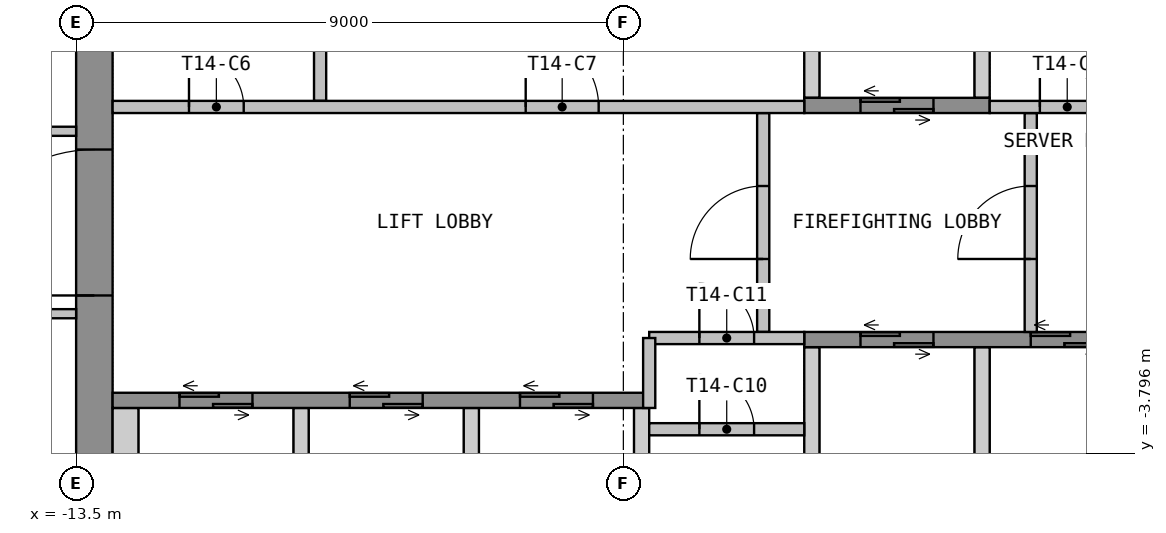
"""IFC4 building model, lengths in metres.
Left out: names, types, materials, properties, quantities, classifications, styles, units other than length and angle.
Written with IfcOpenShell. Run it as: python <this file> out.ifc"""

import sys

from ifc_helpers import new_model, si_unit, direction, frame, frame_2d, origin, place, context, subcontext, project, spatial, polyline, rectangle, outline, extrude, element, fill, save


model = new_model("IFC4")
c1 = context("Model", 3, precision=1e-05, world=origin(), true_north=direction((0.0, 1.0)))
c2 = subcontext(c1, "Body", "Model", "MODEL_VIEW")
j1 = project(units=[si_unit("LENGTHUNIT", "METRE"), si_unit("PLANEANGLEUNIT", "RADIAN")], contexts=[c1])
p1 = place(None, origin())
s1 = spatial("IfcSite", under=j1, at=p1, CompositionType="ELEMENT")
p2 = place(p1, origin())
s2 = spatial("IfcBuilding", under=s1, at=p2, CompositionType="ELEMENT")
p3 = place(p2, frame((0.0, 0.0, 195.6)))
s3 = spatial("IfcBuildingStorey", under=s2, at=p3, CompositionType="ELEMENT", Elevation=195.6)
p4 = place(p3, frame((-13.2, -10.65, 0.0), z_axis=(0.0, 0.0, 1.0), x_axis=(0.0, 1.0, 0.0)))
e1 = element("IfcWall", 1, at=p4, inside=s3, PredefinedType="SHEAR", context=c2, shape_type="SweptSolid", body=[
    extrude(rectangle(XDim=21.3, YDim=0.6, at=frame_2d((10.65, 0.0))), origin(), (0.0, 0.0, 1.0), 3.55),
])
p5 = place(p4, frame((9.45, 0.0, 0.0)))
e2 = element("IfcOpeningElement", 2, at=p5, cuts=e1, PredefinedType="OPENING", context=c2, shape_type="SweptSolid", body=[
    extrude(rectangle(XDim=2.4, YDim=2.1, at=frame_2d((1.2, 1.05))), frame((0.0, 0.31, 0.0), z_axis=(0.0, -1.0, 0.0), x_axis=(1.0, 0.0, 0.0)), (0.0, 0.0, 1.0), 0.62),
])
p6 = place(p3, origin())
e3 = element("IfcWall", 3, at=p6, inside=s3, PredefinedType="SHEAR", context=c2, shape_type="SweptSolid", body=[
    extrude(outline(polyline([(-1.525, 2.05), (-1.275, 2.05), (-1.275, 4.75), (-1.525, 4.75), (-1.525, 2.05)])), origin(), (0.0, 0.0, 1.0), 3.55),
])
p7 = place(p3, origin())
e4 = element("IfcWall", 4, at=p7, inside=s3, PredefinedType="SHEAR", context=c2, shape_type="SweptSolid", body=[
    extrude(outline(polyline([(1.275, 2.05), (1.525, 2.05), (1.525, 4.75), (1.275, 4.75), (1.275, 2.05)])), origin(), (0.0, 0.0, 1.0), 3.55),
])
p8 = place(p3, frame((-1.525, 1.925, 0.0), z_axis=(0.0, 0.0, 1.0), x_axis=(1.0, 0.0, 0.0)))
e5 = element("IfcWall", 5, at=p8, inside=s3, PredefinedType="SHEAR", context=c2, shape_type="SweptSolid", body=[
    extrude(rectangle(XDim=3.05, YDim=0.25, at=frame_2d((1.525, 0.0))), origin(), (0.0, 0.0, 1.0), 3.55),
])
p9 = place(p8, frame((0.925, 0.0, 0.0)))
e6 = element("IfcOpeningElement", 6, at=p9, cuts=e5, PredefinedType="OPENING", context=c2, shape_type="SweptSolid", body=[
    extrude(rectangle(XDim=1.2, YDim=2.1, at=frame_2d((0.6, 1.05))), frame((0.0, 0.135, 0.0), z_axis=(0.0, -1.0, 0.0), x_axis=(1.0, 0.0, 0.0)), (0.0, 0.0, 1.0), 0.27),
])
p10 = place(p3, origin())
e7 = element("IfcWall", 7, at=p10, inside=s3, PredefinedType="SHEAR", context=c2, shape_type="SweptSolid", body=[
    extrude(outline(polyline([(-12.9, -4.75), (-12.475, -4.75), (-12.475, -3.05), (-12.9, -3.05), (-12.9, -4.75)])), origin(), (0.0, 0.0, 1.0), 3.55),
])
p11 = place(p3, origin())
e8 = element("IfcWall", 8, at=p11, inside=s3, PredefinedType="SHEAR", context=c2, shape_type="SweptSolid", body=[
    extrude(outline(polyline([(-9.925, -4.75), (-9.675, -4.75), (-9.675, -3.05), (-9.925, -3.05), (-9.925, -4.75)])), origin(), (0.0, 0.0, 1.0), 3.55),
])
p12 = place(p3, origin())
e9 = element("IfcWall", 9, at=p12, inside=s3, PredefinedType="SHEAR", context=c2, shape_type="SweptSolid", body=[
    extrude(outline(polyline([(-7.125, -4.75), (-6.875, -4.75), (-6.875, -3.05), (-7.125, -3.05), (-7.125, -4.75)])), origin(), (0.0, 0.0, 1.0), 3.55),
])
p13 = place(p3, origin())
e10 = element("IfcWall", 10, at=p13, inside=s3, PredefinedType="SHEAR", context=c2, shape_type="SweptSolid", body=[
    extrude(outline(polyline([(-4.325, -4.75), (-4.075, -4.75), (-4.075, -3.05), (-4.325, -3.05), (-4.325, -4.75)])), origin(), (0.0, 0.0, 1.0), 3.55),
])
p14 = place(p3, origin())
e11 = element("IfcWall", 11, at=p14, inside=s3, PredefinedType="SHEAR", context=c2, shape_type="SweptSolid", body=[
    extrude(outline(polyline([(-1.525, -4.75), (-1.275, -4.75), (-1.275, -2.05), (-1.525, -2.05), (-1.525, -4.75)])), origin(), (0.0, 0.0, 1.0), 3.55),
])
p15 = place(p3, origin())
e12 = element("IfcWall", 12, at=p15, inside=s3, PredefinedType="SHEAR", context=c2, shape_type="SweptSolid", body=[
    extrude(outline(polyline([(1.275, -4.75), (1.525, -4.75), (1.525, -2.05), (1.275, -2.05), (1.275, -4.75)])), origin(), (0.0, 0.0, 1.0), 3.55),
])
p16 = place(p3, frame((-12.9, -2.925, 0.0), z_axis=(0.0, 0.0, 1.0), x_axis=(1.0, 0.0, 0.0)))
e13 = element("IfcWall", 13, at=p16, inside=s3, PredefinedType="SHEAR", context=c2, shape_type="SweptSolid", body=[
    extrude(rectangle(XDim=8.825, YDim=0.25, at=frame_2d((4.413, 0.0))), origin(), (0.0, 0.0, 1.0), 3.55),
])
p17 = place(p16, frame((1.1, 0.0, 0.0)))
e14 = element("IfcOpeningElement", 14, at=p17, cuts=e13, PredefinedType="OPENING", context=c2, shape_type="SweptSolid", body=[
    extrude(rectangle(XDim=1.2, YDim=2.1, at=frame_2d((0.6, 1.05))), frame((0.0, 0.135, 0.0), z_axis=(0.0, -1.0, 0.0), x_axis=(1.0, 0.0, 0.0)), (0.0, 0.0, 1.0), 0.27),
])
p18 = place(p16, frame((3.9, 0.0, 0.0)))
e15 = element("IfcOpeningElement", 15, at=p18, cuts=e13, PredefinedType="OPENING", context=c2, shape_type="SweptSolid", body=[
    extrude(rectangle(XDim=1.2, YDim=2.1, at=frame_2d((0.6, 1.05))), frame((0.0, 0.135, 0.0), z_axis=(0.0, -1.0, 0.0), x_axis=(1.0, 0.0, 0.0)), (0.0, 0.0, 1.0), 0.27),
])
p19 = place(p16, frame((6.7, 0.0, 0.0)))
e16 = element("IfcOpeningElement", 16, at=p19, cuts=e13, PredefinedType="OPENING", context=c2, shape_type="SweptSolid", body=[
    extrude(rectangle(XDim=1.2, YDim=2.1, at=frame_2d((0.6, 1.05))), frame((0.0, 0.135, 0.0), z_axis=(0.0, -1.0, 0.0), x_axis=(1.0, 0.0, 0.0)), (0.0, 0.0, 1.0), 0.27),
])
p20 = place(p3, frame((-1.525, -1.925, 0.0), z_axis=(0.0, 0.0, 1.0), x_axis=(1.0, 0.0, 0.0)))
e17 = element("IfcWall", 17, at=p20, inside=s3, PredefinedType="SHEAR", context=c2, shape_type="SweptSolid", body=[
    extrude(rectangle(XDim=14.425, YDim=0.25, at=frame_2d((7.212, 0.0))), origin(), (0.0, 0.0, 1.0), 3.55),
])
p21 = place(p20, frame((0.925, 0.0, 0.0)))
e18 = element("IfcOpeningElement", 18, at=p21, cuts=e17, PredefinedType="OPENING", context=c2, shape_type="SweptSolid", body=[
    extrude(rectangle(XDim=1.2, YDim=2.1, at=frame_2d((0.6, 1.05))), frame((0.0, 0.135, 0.0), z_axis=(0.0, -1.0, 0.0), x_axis=(1.0, 0.0, 0.0)), (0.0, 0.0, 1.0), 0.27),
])
p22 = place(p20, frame((3.725, 0.0, 0.0)))
e19 = element("IfcOpeningElement", 19, at=p22, cuts=e17, PredefinedType="OPENING", context=c2, shape_type="SweptSolid", body=[
    extrude(rectangle(XDim=1.2, YDim=2.1, at=frame_2d((0.6, 1.05))), frame((0.0, 0.135, 0.0), z_axis=(0.0, -1.0, 0.0), x_axis=(1.0, 0.0, 0.0)), (0.0, 0.0, 1.0), 0.27),
])
p23 = place(p3, frame((-2.2, -1.8, 0.0), z_axis=(0.0, 0.0, 1.0), x_axis=(0.0, 1.0, 0.0)))
e20 = element("IfcWall", 20, at=p23, inside=s3, PredefinedType="PARTITIONING", context=c2, shape_type="SweptSolid", body=[
    extrude(rectangle(XDim=3.6, YDim=0.2, at=frame_2d((1.8, 0.0))), origin(), (0.0, 0.0, 1.0), 3.55),
])
p24 = place(p23, frame((1.2, 0.0, 0.0)))
e21 = element("IfcOpeningElement", 21, at=p24, cuts=e20, PredefinedType="OPENING", context=c2, shape_type="SweptSolid", body=[
    extrude(rectangle(XDim=1.2, YDim=2.1, at=frame_2d((0.6, 1.05))), frame((0.0, 0.11, 0.0), z_axis=(0.0, -1.0, 0.0), x_axis=(1.0, 0.0, 0.0)), (0.0, 0.0, 1.0), 0.22),
])
p25 = place(p3, frame((2.2, -1.8, 0.0), z_axis=(0.0, 0.0, 1.0), x_axis=(0.0, 1.0, 0.0)))
e22 = element("IfcWall", 22, at=p25, inside=s3, PredefinedType="PARTITIONING", context=c2, shape_type="SweptSolid", body=[
    extrude(rectangle(XDim=3.6, YDim=0.2, at=frame_2d((1.8, 0.0))), origin(), (0.0, 0.0, 1.0), 3.55),
])
p26 = place(p25, frame((1.2, 0.0, 0.0)))
e23 = element("IfcOpeningElement", 23, at=p26, cuts=e22, PredefinedType="OPENING", context=c2, shape_type="SweptSolid", body=[
    extrude(rectangle(XDim=1.2, YDim=2.1, at=frame_2d((0.6, 1.05))), frame((0.0, 0.11, 0.0), z_axis=(0.0, -1.0, 0.0), x_axis=(1.0, 0.0, 0.0)), (0.0, 0.0, 1.0), 0.22),
])
p27 = place(p3, frame((-9.488, 2.0, 0.0), z_axis=(0.0, 0.0, 1.0), x_axis=(0.0, 1.0, 0.0)))
e24 = element("IfcWall", 24, at=p27, inside=s3, PredefinedType="PARTITIONING", context=c2, shape_type="SweptSolid", body=[
    extrude(rectangle(XDim=2.8, YDim=0.2, at=frame_2d((1.4, 0.0))), origin(), (0.0, 0.0, 1.0), 3.55),
])
p28 = place(p3, frame((-12.9, 1.9, 0.0), z_axis=(0.0, 0.0, 1.0), x_axis=(1.0, 0.0, 0.0)))
e25 = element("IfcWall", 25, at=p28, inside=s3, PredefinedType="PARTITIONING", context=c2, shape_type="SweptSolid", body=[
    extrude(rectangle(XDim=11.375, YDim=0.2, at=frame_2d((5.688, 0.0))), origin(), (0.0, 0.0, 1.0), 3.55),
])
p29 = place(p28, frame((1.256, 0.0, 0.0)))
e26 = element("IfcOpeningElement", 26, at=p29, cuts=e25, PredefinedType="OPENING", context=c2, shape_type="SweptSolid", body=[
    extrude(rectangle(XDim=0.9, YDim=2.1, at=frame_2d((0.45, 1.05))), frame((0.0, 0.11, 0.0), z_axis=(0.0, -1.0, 0.0), x_axis=(1.0, 0.0, 0.0)), (0.0, 0.0, 1.0), 0.22),
])
p30 = place(p28, frame((6.794, 0.0, 0.0)))
e27 = element("IfcOpeningElement", 27, at=p30, cuts=e25, PredefinedType="OPENING", context=c2, shape_type="SweptSolid", body=[
    extrude(rectangle(XDim=1.2, YDim=2.1, at=frame_2d((0.6, 1.05))), frame((0.0, 0.11, 0.0), z_axis=(0.0, -1.0, 0.0), x_axis=(1.0, 0.0, 0.0)), (0.0, 0.0, 1.0), 0.22),
])
p31 = place(p3, frame((1.525, 1.9, 0.0), z_axis=(0.0, 0.0, 1.0), x_axis=(1.0, 0.0, 0.0)))
e28 = element("IfcWall", 28, at=p31, inside=s3, PredefinedType="PARTITIONING", context=c2, shape_type="SweptSolid", body=[
    extrude(rectangle(XDim=2.55, YDim=0.2, at=frame_2d((1.275, 0.0))), origin(), (0.0, 0.0, 1.0), 3.55),
])
p32 = place(p31, frame((0.825, 0.0, 0.0)))
e29 = element("IfcOpeningElement", 29, at=p32, cuts=e28, PredefinedType="OPENING", context=c2, shape_type="SweptSolid", body=[
    extrude(rectangle(XDim=0.9, YDim=2.1, at=frame_2d((0.45, 1.05))), frame((0.0, 0.11, 0.0), z_axis=(0.0, -1.0, 0.0), x_axis=(1.0, 0.0, 0.0)), (0.0, 0.0, 1.0), 0.22),
])
p33 = place(p3, frame((-4.075, -3.4, 0.0), z_axis=(0.0, 0.0, 1.0), x_axis=(1.0, 0.0, 0.0)))
e30 = element("IfcWall", 30, at=p33, inside=s3, PredefinedType="PARTITIONING", context=c2, shape_type="SweptSolid", body=[
    extrude(rectangle(XDim=2.55, YDim=0.2, at=frame_2d((1.275, 0.0))), origin(), (0.0, 0.0, 1.0), 3.55),
])
p34 = place(p33, frame((0.825, 0.0, 0.0)))
e31 = element("IfcOpeningElement", 31, at=p34, cuts=e30, PredefinedType="OPENING", context=c2, shape_type="SweptSolid", body=[
    extrude(rectangle(XDim=0.9, YDim=2.1, at=frame_2d((0.45, 1.05))), frame((0.0, 0.11, 0.0), z_axis=(0.0, -1.0, 0.0), x_axis=(1.0, 0.0, 0.0)), (0.0, 0.0, 1.0), 0.22),
])
p35 = place(p3, frame((-4.075, -1.9, 0.0), z_axis=(0.0, 0.0, 1.0), x_axis=(1.0, 0.0, 0.0)))
e32 = element("IfcWall", 32, at=p35, inside=s3, PredefinedType="PARTITIONING", context=c2, shape_type="SweptSolid", body=[
    extrude(rectangle(XDim=2.55, YDim=0.2, at=frame_2d((1.275, 0.0))), origin(), (0.0, 0.0, 1.0), 3.55),
])
p36 = place(p35, frame((0.825, 0.0, 0.0)))
e33 = element("IfcOpeningElement", 33, at=p36, cuts=e32, PredefinedType="OPENING", context=c2, shape_type="SweptSolid", body=[
    extrude(rectangle(XDim=0.9, YDim=2.1, at=frame_2d((0.45, 1.05))), frame((0.0, 0.11, 0.0), z_axis=(0.0, -1.0, 0.0), x_axis=(1.0, 0.0, 0.0)), (0.0, 0.0, 1.0), 0.22),
])
p37 = place(p3, frame((-4.075, -1.9, 0.0), z_axis=(0.0, 0.0, 1.0), x_axis=(0.0, -1.0, 0.0)))
e34 = element("IfcWall", 34, at=p37, inside=s3, PredefinedType="PARTITIONING", context=c2, shape_type="SweptSolid", body=[
    extrude(rectangle(XDim=1.15, YDim=0.2, at=frame_2d((0.575, 0.0))), origin(), (0.0, 0.0, 1.0), 3.55),
])
for number, where, z_axis, x_axis in (
    (35, (-17.925, -1.5, 0.0), (0.0, 0.0, 1.0), (1.0, 0.0, 0.0)),
    (36, (-13.5, 1.5, 0.0), (0.0, 0.0, 1.0), (-1.0, 0.0, 0.0)),
):
    element("IfcWall", number, at=place(p3, frame(where, z_axis=z_axis, x_axis=x_axis)), inside=s3, PredefinedType="PARTITIONING", context=c2, shape_type="SweptSolid", body=[
        extrude(rectangle(XDim=4.425, YDim=0.15, at=frame_2d((2.212, 0.0))), origin(), (0.0, 0.0, 1.0), 3.55),
    ])
p38 = place(p5, origin())
e37 = element("IfcDoor", 37, at=p38, inside=s3, OperationType="DOUBLE_DOOR_DOUBLE_SWING", PredefinedType="DOOR", context=c2, shape_type="SweptSolid", body=[
    extrude(rectangle(XDim=2.4, YDim=2.1, at=frame_2d((1.2, 1.05))), frame((0.0, 0.025, 0.0), z_axis=(0.0, -1.0, 0.0), x_axis=(1.0, 0.0, 0.0)), (0.0, 0.0, 1.0), 0.05),
])
fill(e2, e37)
p39 = place(p9, origin())
e38 = element("IfcDoor", 38, at=p39, inside=s3, OperationType="DOUBLE_DOOR_SLIDING", PredefinedType="DOOR", context=c2, shape_type="SweptSolid", body=[
    extrude(rectangle(XDim=1.2, YDim=2.1, at=frame_2d((0.6, 1.05))), frame((0.0, 0.025, 0.0), z_axis=(0.0, -1.0, 0.0), x_axis=(1.0, 0.0, 0.0)), (0.0, 0.0, 1.0), 0.05),
])
fill(e6, e38)
p40 = place(p17, origin())
e39 = element("IfcDoor", 39, at=p40, inside=s3, OperationType="DOUBLE_DOOR_SLIDING", PredefinedType="DOOR", context=c2, shape_type="SweptSolid", body=[
    extrude(rectangle(XDim=1.2, YDim=2.1, at=frame_2d((0.6, 1.05))), frame((0.0, 0.025, 0.0), z_axis=(0.0, -1.0, 0.0), x_axis=(1.0, 0.0, 0.0)), (0.0, 0.0, 1.0), 0.05),
])
fill(e14, e39)
p41 = place(p18, origin())
e40 = element("IfcDoor", 40, at=p41, inside=s3, OperationType="DOUBLE_DOOR_SLIDING", PredefinedType="DOOR", context=c2, shape_type="SweptSolid", body=[
    extrude(rectangle(XDim=1.2, YDim=2.1, at=frame_2d((0.6, 1.05))), frame((0.0, 0.025, 0.0), z_axis=(0.0, -1.0, 0.0), x_axis=(1.0, 0.0, 0.0)), (0.0, 0.0, 1.0), 0.05),
])
fill(e15, e40)
p42 = place(p19, origin())
e41 = element("IfcDoor", 41, at=p42, inside=s3, OperationType="DOUBLE_DOOR_SLIDING", PredefinedType="DOOR", context=c2, shape_type="SweptSolid", body=[
    extrude(rectangle(XDim=1.2, YDim=2.1, at=frame_2d((0.6, 1.05))), frame((0.0, 0.025, 0.0), z_axis=(0.0, -1.0, 0.0), x_axis=(1.0, 0.0, 0.0)), (0.0, 0.0, 1.0), 0.05),
])
fill(e16, e41)
p43 = place(p21, origin())
e42 = element("IfcDoor", 42, at=p43, inside=s3, OperationType="DOUBLE_DOOR_SLIDING", PredefinedType="DOOR", context=c2, shape_type="SweptSolid", body=[
    extrude(rectangle(XDim=1.2, YDim=2.1, at=frame_2d((0.6, 1.05))), frame((0.0, 0.025, 0.0), z_axis=(0.0, -1.0, 0.0), x_axis=(1.0, 0.0, 0.0)), (0.0, 0.0, 1.0), 0.05),
])
fill(e18, e42)
p44 = place(p22, origin())
e43 = element("IfcDoor", 43, at=p44, inside=s3, OperationType="DOUBLE_DOOR_SLIDING", PredefinedType="DOOR", context=c2, shape_type="SweptSolid", body=[
    extrude(rectangle(XDim=1.2, YDim=2.1, at=frame_2d((0.6, 1.05))), frame((0.0, 0.025, 0.0), z_axis=(0.0, -1.0, 0.0), x_axis=(1.0, 0.0, 0.0)), (0.0, 0.0, 1.0), 0.05),
])
fill(e19, e43)
p45 = place(p24, origin())
e44 = element("IfcDoor", 44, at=p45, inside=s3, OperationType="SINGLE_SWING_LEFT", PredefinedType="DOOR", context=c2, shape_type="SweptSolid", body=[
    extrude(rectangle(XDim=1.2, YDim=2.1, at=frame_2d((0.6, 1.05))), frame((0.0, 0.025, 0.0), z_axis=(0.0, -1.0, 0.0), x_axis=(1.0, 0.0, 0.0)), (0.0, 0.0, 1.0), 0.05),
])
fill(e21, e44)
p46 = place(p26, origin())
e45 = element("IfcDoor", 45, at=p46, inside=s3, OperationType="SINGLE_SWING_LEFT", PredefinedType="DOOR", context=c2, shape_type="SweptSolid", body=[
    extrude(rectangle(XDim=1.2, YDim=2.1, at=frame_2d((0.6, 1.05))), frame((0.0, 0.025, 0.0), z_axis=(0.0, -1.0, 0.0), x_axis=(1.0, 0.0, 0.0)), (0.0, 0.0, 1.0), 0.05),
])
fill(e23, e45)
p47 = place(p29, origin())
e46 = element("IfcDoor", 46, at=p47, inside=s3, OperationType="SINGLE_SWING_LEFT", PredefinedType="DOOR", context=c2, shape_type="SweptSolid", body=[
    extrude(rectangle(XDim=0.9, YDim=2.1, at=frame_2d((0.45, 1.05))), frame((0.0, 0.025, 0.0), z_axis=(0.0, -1.0, 0.0), x_axis=(1.0, 0.0, 0.0)), (0.0, 0.0, 1.0), 0.05),
])
fill(e26, e46)
p48 = place(p30, origin())
e47 = element("IfcDoor", 47, at=p48, inside=s3, OperationType="SINGLE_SWING_RIGHT", PredefinedType="DOOR", context=c2, shape_type="SweptSolid", body=[
    extrude(rectangle(XDim=1.2, YDim=2.1, at=frame_2d((0.6, 1.05))), frame((0.0, 0.025, 0.0), z_axis=(0.0, -1.0, 0.0), x_axis=(1.0, 0.0, 0.0)), (0.0, 0.0, 1.0), 0.05),
])
fill(e27, e47)
p49 = place(p32, origin())
e48 = element("IfcDoor", 48, at=p49, inside=s3, OperationType="SINGLE_SWING_LEFT", PredefinedType="DOOR", context=c2, shape_type="SweptSolid", body=[
    extrude(rectangle(XDim=0.9, YDim=2.1, at=frame_2d((0.45, 1.05))), frame((0.0, 0.025, 0.0), z_axis=(0.0, -1.0, 0.0), x_axis=(1.0, 0.0, 0.0)), (0.0, 0.0, 1.0), 0.05),
])
fill(e29, e48)
p50 = place(p34, origin())
e49 = element("IfcDoor", 49, at=p50, inside=s3, OperationType="SINGLE_SWING_LEFT", PredefinedType="DOOR", context=c2, shape_type="SweptSolid", body=[
    extrude(rectangle(XDim=0.9, YDim=2.1, at=frame_2d((0.45, 1.05))), frame((0.0, 0.025, 0.0), z_axis=(0.0, -1.0, 0.0), x_axis=(1.0, 0.0, 0.0)), (0.0, 0.0, 1.0), 0.05),
])
fill(e31, e49)
p51 = place(p36, origin())
e50 = element("IfcDoor", 50, at=p51, inside=s3, OperationType="SINGLE_SWING_LEFT", PredefinedType="DOOR", context=c2, shape_type="SweptSolid", body=[
    extrude(rectangle(XDim=0.9, YDim=2.1, at=frame_2d((0.45, 1.05))), frame((0.0, 0.025, 0.0), z_axis=(0.0, -1.0, 0.0), x_axis=(1.0, 0.0, 0.0)), (0.0, 0.0, 1.0), 0.05),
])
fill(e33, e50)
save(model, sys.argv[1])
